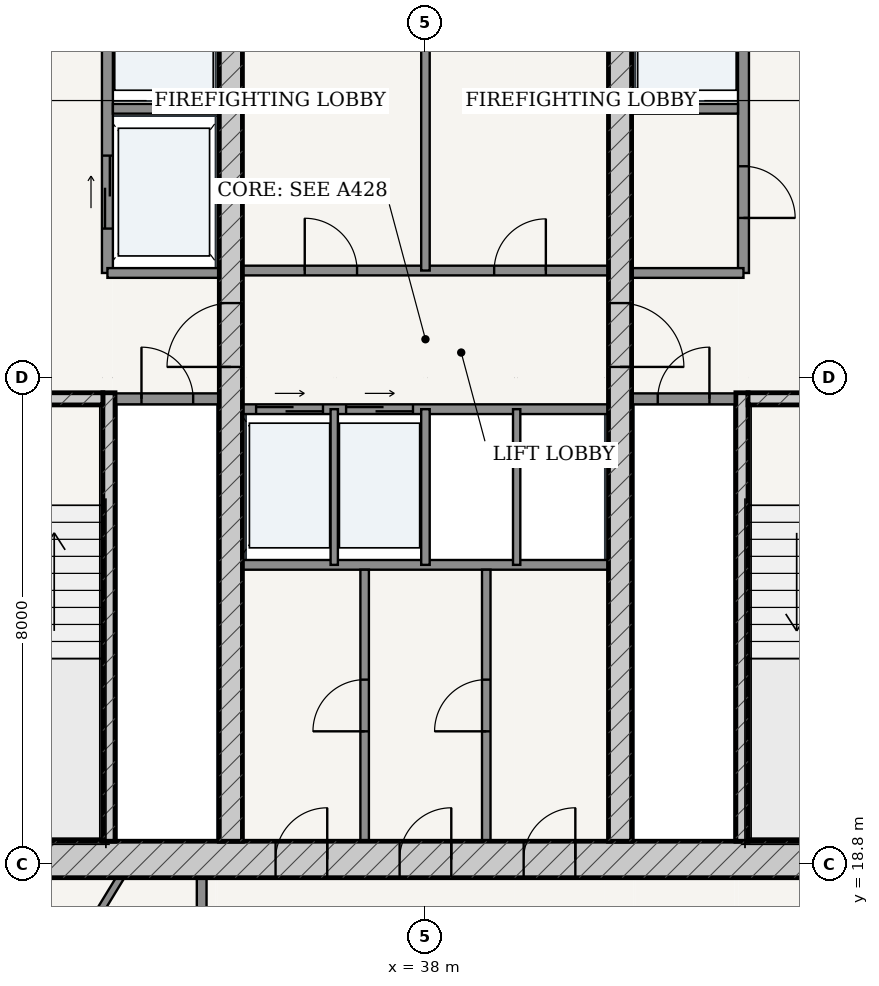
"""IFC4 building model, lengths in metres.
Left out: names, types, materials, properties, quantities, classifications, styles, units other than length and angle.
Written with IfcOpenShell. Run it as: python <this file> out.ifc"""

import sys

from ifc_helpers import new_model, si_unit, direction, frame, frame_2d, origin, place, context, subcontext, project, spatial, rectangle, extrude, source, transform, mapped, element, fill, save


model = new_model("IFC4")
c1 = context("Model", 3, precision=1e-05, world=origin(), true_north=direction((-0.2419218956, 0.970295726276)))
c2 = subcontext(c1, "Body", "Model", "MODEL_VIEW")
j1 = project(units=[si_unit("LENGTHUNIT", "METRE"), si_unit("PLANEANGLEUNIT", "RADIAN")], contexts=[c1])
p1 = place(None, origin())
s1 = spatial("IfcSite", under=j1, at=p1, CompositionType="ELEMENT")
p2 = place(p1, origin())
s2 = spatial("IfcBuilding", under=s1, at=p2, CompositionType="ELEMENT")
p3 = place(p2, frame((0.0, 0.0, 206.0)))
s3 = spatial("IfcBuildingStorey", under=s2, at=p3, CompositionType="ELEMENT", Elevation=206.0)
p4 = place(p3, frame((28.775, 18.875, 0.0), z_axis=(0.0, 0.0, 1.0), x_axis=(1.0, 0.0, 0.0)))
e1 = element("IfcWall", 1, at=p4, inside=s3, PredefinedType="SHEAR", context=c2, shape_type="SweptSolid", body=[
    extrude(rectangle(XDim=18.45, YDim=0.6, at=frame_2d((9.225, 0.0))), origin(), (0.0, 0.0, 1.0), 3.435),
])
p5 = place(p4, frame((6.76, 0.0, 0.0)))
e2 = element("IfcOpeningElement", 2, at=p5, cuts=e1, PredefinedType="OPENING", context=c2, shape_type="SweptSolid", body=[
    extrude(rectangle(XDim=0.85, YDim=2.1, at=frame_2d((0.425, 1.05))), frame((0.0, 0.31, 0.0), z_axis=(0.0, -1.0, 0.0), x_axis=(1.0, 0.0, 0.0)), (0.0, 0.0, 1.0), 0.62),
])
p6 = place(p4, frame((8.8, 0.0, 0.0)))
e3 = element("IfcOpeningElement", 3, at=p6, cuts=e1, PredefinedType="OPENING", context=c2, shape_type="SweptSolid", body=[
    extrude(rectangle(XDim=0.85, YDim=2.1, at=frame_2d((0.425, 1.05))), frame((0.0, 0.31, 0.0), z_axis=(0.0, -1.0, 0.0), x_axis=(1.0, 0.0, 0.0)), (0.0, 0.0, 1.0), 0.62),
])
p7 = place(p4, frame((10.84, 0.0, 0.0)))
e4 = element("IfcOpeningElement", 4, at=p7, cuts=e1, PredefinedType="OPENING", context=c2, shape_type="SweptSolid", body=[
    extrude(rectangle(XDim=0.85, YDim=2.1, at=frame_2d((0.425, 1.05))), frame((0.0, 0.31, 0.0), z_axis=(0.0, -1.0, 0.0), x_axis=(1.0, 0.0, 0.0)), (0.0, 0.0, 1.0), 0.62),
])
p8 = place(p3, frame((32.795, 19.175, 0.0), z_axis=(0.0, 0.0, 1.0), x_axis=(0.0, 1.0, 0.0)))
e5 = element("IfcWall", 5, at=p8, inside=s3, PredefinedType="SOLIDWALL", context=c2, shape_type="SweptSolid", body=[
    extrude(rectangle(XDim=7.375, YDim=0.2, at=frame_2d((3.688, 0.0))), origin(), (0.0, 0.0, 1.0), 3.435),
])
p9 = place(p3, frame((29.375, 26.45, 0.0), z_axis=(0.0, 0.0, 1.0), x_axis=(1.0, 0.0, 0.0)))
e6 = element("IfcWall", 6, at=p9, inside=s3, PredefinedType="SOLIDWALL", context=c2, shape_type="SweptSolid", body=[
    extrude(rectangle(XDim=3.32, YDim=0.2, at=frame_2d((1.66, 0.0))), origin(), (0.0, 0.0, 1.0), 3.435),
])
p10 = place(p9, frame((1.185, 0.0, 0.0)))
e7 = element("IfcOpeningElement", 7, at=p10, cuts=e6, PredefinedType="OPENING", context=c2, shape_type="SweptSolid", body=[
    extrude(rectangle(XDim=0.95, YDim=2.15, at=frame_2d((0.475, 1.075))), frame((0.0, 0.11, 0.0), z_axis=(0.0, -1.0, 0.0), x_axis=(1.0, 0.0, 0.0)), (0.0, 0.0, 1.0), 0.22),
])
p11 = place(p3, frame((43.205, 19.175, 0.0), z_axis=(0.0, 0.0, 1.0), x_axis=(0.0, 1.0, 0.0)))
e8 = element("IfcWall", 8, at=p11, inside=s3, PredefinedType="SOLIDWALL", context=c2, shape_type="SweptSolid", body=[
    extrude(rectangle(XDim=7.375, YDim=0.2, at=frame_2d((3.688, 0.0))), origin(), (0.0, 0.0, 1.0), 3.435),
])
p12 = place(p3, frame((43.305, 26.45, 0.0), z_axis=(0.0, 0.0, 1.0), x_axis=(1.0, 0.0, 0.0)))
e9 = element("IfcWall", 9, at=p12, inside=s3, PredefinedType="SOLIDWALL", context=c2, shape_type="SweptSolid", body=[
    extrude(rectangle(XDim=3.32, YDim=0.2, at=frame_2d((1.66, 0.0))), origin(), (0.0, 0.0, 1.0), 3.435),
])
p13 = place(p12, frame((1.185, 0.0, 0.0)))
e10 = element("IfcOpeningElement", 10, at=p13, cuts=e9, PredefinedType="OPENING", context=c2, shape_type="SweptSolid", body=[
    extrude(rectangle(XDim=0.95, YDim=2.15, at=frame_2d((0.475, 1.075))), frame((0.0, 0.11, 0.0), z_axis=(0.0, -1.0, 0.0), x_axis=(1.0, 0.0, 0.0)), (0.0, 0.0, 1.0), 0.22),
])
p14 = place(p3, frame((34.8, 19.175, 0.0), z_axis=(0.0, 0.0, 1.0), x_axis=(0.0, 1.0, 0.0)))
e11 = element("IfcWall", 11, at=p14, inside=s3, PredefinedType="SHEAR", context=c2, shape_type="SweptSolid", body=[
    extrude(rectangle(XDim=15.25, YDim=0.38, at=frame_2d((7.625, 0.0))), origin(), (0.0, 0.0, 1.0), 3.435),
])
p15 = place(p14, frame((7.8, 0.0, 0.0)))
e12 = element("IfcOpeningElement", 12, at=p15, cuts=e11, PredefinedType="OPENING", context=c2, shape_type="SweptSolid", body=[
    extrude(rectangle(XDim=1.05, YDim=2.15, at=frame_2d((0.525, 1.075))), frame((0.0, 0.2, 0.0), z_axis=(0.0, -1.0, 0.0), x_axis=(1.0, 0.0, 0.0)), (0.0, 0.0, 1.0), 0.4),
])
p16 = place(p3, frame((41.2, 19.175, 0.0), z_axis=(0.0, 0.0, 1.0), x_axis=(0.0, 1.0, 0.0)))
e13 = element("IfcWall", 13, at=p16, inside=s3, PredefinedType="SHEAR", context=c2, shape_type="SweptSolid", body=[
    extrude(rectangle(XDim=15.25, YDim=0.38, at=frame_2d((7.625, 0.0))), origin(), (0.0, 0.0, 1.0), 3.435),
])
p17 = place(p16, frame((7.8, 0.0, 0.0)))
e14 = element("IfcOpeningElement", 14, at=p17, cuts=e13, PredefinedType="OPENING", context=c2, shape_type="SweptSolid", body=[
    extrude(rectangle(XDim=1.05, YDim=2.15, at=frame_2d((0.525, 1.075))), frame((0.0, 0.2, 0.0), z_axis=(0.0, -1.0, 0.0), x_axis=(1.0, 0.0, 0.0)), (0.0, 0.0, 1.0), 0.4),
])
p18 = place(p3, frame((32.9, 26.45, 0.0), z_axis=(0.0, 0.0, 1.0), x_axis=(1.0, 0.0, 0.0)))
e15 = element("IfcWall", 15, at=p18, inside=s3, PredefinedType="PARTITIONING", context=c2, shape_type="SweptSolid", body=[
    extrude(rectangle(XDim=1.71, YDim=0.18, at=frame_2d((0.855, 0.0))), origin(), (0.0, 0.0, 1.0), 3.435),
])
p19 = place(p18, frame((0.43, 0.0, 0.0)))
e16 = element("IfcOpeningElement", 16, at=p19, cuts=e15, PredefinedType="OPENING", context=c2, shape_type="SweptSolid", body=[
    extrude(rectangle(XDim=0.85, YDim=2.1, at=frame_2d((0.425, 1.05))), frame((0.0, 0.1, 0.0), z_axis=(0.0, -1.0, 0.0), x_axis=(1.0, 0.0, 0.0)), (0.0, 0.0, 1.0), 0.2),
])
p20 = place(p3, frame((41.39, 26.45, 0.0), z_axis=(0.0, 0.0, 1.0), x_axis=(1.0, 0.0, 0.0)))
e17 = element("IfcWall", 17, at=p20, inside=s3, PredefinedType="PARTITIONING", context=c2, shape_type="SweptSolid", body=[
    extrude(rectangle(XDim=1.71, YDim=0.18, at=frame_2d((0.855, 0.0))), origin(), (0.0, 0.0, 1.0), 3.435),
])
p21 = place(p20, frame((0.43, 0.0, 0.0)))
e18 = element("IfcOpeningElement", 18, at=p21, cuts=e17, PredefinedType="OPENING", context=c2, shape_type="SweptSolid", body=[
    extrude(rectangle(XDim=0.85, YDim=2.1, at=frame_2d((0.425, 1.05))), frame((0.0, 0.1, 0.0), z_axis=(0.0, -1.0, 0.0), x_axis=(1.0, 0.0, 0.0)), (0.0, 0.0, 1.0), 0.2),
])
p22 = place(p3, frame((32.77, 28.52, 0.0), z_axis=(0.0, 0.0, 1.0), x_axis=(0.0, 1.0, 0.0)))
e19 = element("IfcWall", 19, at=p22, inside=s3, PredefinedType="PARTITIONING", context=c2, shape_type="SweptSolid", body=[
    extrude(rectangle(XDim=5.905, YDim=0.18, at=frame_2d((2.953, 0.0))), origin(), (0.0, 0.0, 1.0), 3.435),
])
p23 = place(p22, frame((3.655, 0.0, 0.0)))
e20 = element("IfcOpeningElement", 20, at=p23, cuts=e19, PredefinedType="OPENING", context=c2, shape_type="SweptSolid", body=[
    extrude(rectangle(XDim=1.15, YDim=2.2, at=frame_2d((0.575, 1.1))), frame((0.0, 0.1, 0.0), z_axis=(0.0, -1.0, 0.0), x_axis=(1.0, 0.0, 0.0)), (0.0, 0.0, 1.0), 0.2),
])
p24 = place(p22, frame((0.73, 0.0, 0.0)))
e21 = element("IfcOpeningElement", 21, at=p24, cuts=e19, PredefinedType="OPENING", context=c2, shape_type="SweptSolid", body=[
    extrude(rectangle(XDim=1.2, YDim=2.25, at=frame_2d((0.6, 1.125))), frame((0.0, 0.1, 0.0), z_axis=(0.0, -1.0, 0.0), x_axis=(1.0, 0.0, 0.0)), (0.0, 0.0, 1.0), 0.2),
])
p25 = place(p3, frame((32.86, 31.22, 0.0), z_axis=(0.0, 0.0, 1.0), x_axis=(1.0, 0.0, 0.0)))
e22 = element("IfcWall", 22, at=p25, inside=s3, PredefinedType="PARTITIONING", context=c2, shape_type="SweptSolid", body=[
    extrude(rectangle(XDim=1.75, YDim=0.16, at=frame_2d((0.875, 0.0))), origin(), (0.0, 0.0, 1.0), 3.435),
])
p26 = place(p3, frame((32.77, 28.52, 0.0), z_axis=(0.0, 0.0, 1.0), x_axis=(1.0, 0.0, 0.0)))
e23 = element("IfcWall", 23, at=p26, inside=s3, PredefinedType="PARTITIONING", context=c2, shape_type="SweptSolid", body=[
    extrude(rectangle(XDim=1.84, YDim=0.16, at=frame_2d((0.92, 0.0))), origin(), (0.0, 0.0, 1.0), 3.435),
])
p27 = place(p3, frame((43.23, 28.52, 0.0), z_axis=(0.0, 0.0, 1.0), x_axis=(0.0, 1.0, 0.0)))
e24 = element("IfcWall", 24, at=p27, inside=s3, PredefinedType="PARTITIONING", context=c2, shape_type="SweptSolid", body=[
    extrude(rectangle(XDim=5.905, YDim=0.18, at=frame_2d((2.953, 0.0))), origin(), (0.0, 0.0, 1.0), 3.435),
])
p28 = place(p27, frame((0.905, 0.0, 0.0)))
e25 = element("IfcOpeningElement", 25, at=p28, cuts=e24, PredefinedType="OPENING", context=c2, shape_type="SweptSolid", body=[
    extrude(rectangle(XDim=0.85, YDim=2.1, at=frame_2d((0.425, 1.05))), frame((0.0, 0.1, 0.0), z_axis=(0.0, -1.0, 0.0), x_axis=(1.0, 0.0, 0.0)), (0.0, 0.0, 1.0), 0.2),
])
p29 = place(p27, frame((3.655, 0.0, 0.0)))
e26 = element("IfcOpeningElement", 26, at=p29, cuts=e24, PredefinedType="OPENING", context=c2, shape_type="SweptSolid", body=[
    extrude(rectangle(XDim=1.15, YDim=2.2, at=frame_2d((0.575, 1.1))), frame((0.0, 0.1, 0.0), z_axis=(0.0, -1.0, 0.0), x_axis=(1.0, 0.0, 0.0)), (0.0, 0.0, 1.0), 0.2),
])
p30 = place(p3, frame((41.39, 31.22, 0.0), z_axis=(0.0, 0.0, 1.0), x_axis=(1.0, 0.0, 0.0)))
e27 = element("IfcWall", 27, at=p30, inside=s3, PredefinedType="PARTITIONING", context=c2, shape_type="SweptSolid", body=[
    extrude(rectangle(XDim=1.75, YDim=0.16, at=frame_2d((0.875, 0.0))), origin(), (0.0, 0.0, 1.0), 3.435),
])
p31 = place(p3, frame((41.39, 28.52, 0.0), z_axis=(0.0, 0.0, 1.0), x_axis=(1.0, 0.0, 0.0)))
e28 = element("IfcWall", 28, at=p31, inside=s3, PredefinedType="PARTITIONING", context=c2, shape_type="SweptSolid", body=[
    extrude(rectangle(XDim=1.84, YDim=0.16, at=frame_2d((0.92, 0.0))), origin(), (0.0, 0.0, 1.0), 3.435),
])
p32 = place(p3, frame((34.99, 28.56, 0.0), z_axis=(0.0, 0.0, 1.0), x_axis=(1.0, 0.0, 0.0)))
e29 = element("IfcWall", 29, at=p32, inside=s3, PredefinedType="PARTITIONING", context=c2, shape_type="SweptSolid", body=[
    extrude(rectangle(XDim=6.02, YDim=0.16, at=frame_2d((3.01, 0.0))), origin(), (0.0, 0.0, 1.0), 3.435),
])
p33 = place(p32, frame((1.025, 0.0, 0.0)))
e30 = element("IfcOpeningElement", 30, at=p33, cuts=e29, PredefinedType="OPENING", context=c2, shape_type="SweptSolid", body=[
    extrude(rectangle(XDim=0.86, YDim=2.1, at=frame_2d((0.43, 1.05))), frame((0.0, 0.09, 0.0), z_axis=(0.0, -1.0, 0.0), x_axis=(1.0, 0.0, 0.0)), (0.0, 0.0, 1.0), 0.18),
])
p34 = place(p32, frame((4.14, 0.0, 0.0)))
e31 = element("IfcOpeningElement", 31, at=p34, cuts=e29, PredefinedType="OPENING", context=c2, shape_type="SweptSolid", body=[
    extrude(rectangle(XDim=0.85, YDim=2.1, at=frame_2d((0.425, 1.05))), frame((0.0, 0.09, 0.0), z_axis=(0.0, -1.0, 0.0), x_axis=(1.0, 0.0, 0.0)), (0.0, 0.0, 1.0), 0.18),
])
p35 = place(p3, frame((38.0, 28.56, 0.0), z_axis=(0.0, 0.0, 1.0), x_axis=(0.0, 1.0, 0.0)))
e32 = element("IfcWall", 32, at=p35, inside=s3, PredefinedType="PARTITIONING", context=c2, shape_type="SweptSolid", body=[
    extrude(rectangle(XDim=5.865, YDim=0.14, at=frame_2d((2.933, 0.0))), origin(), (0.0, 0.0, 1.0), 3.435),
])
p36 = place(p3, frame((34.99, 26.28, 0.0), z_axis=(0.0, 0.0, 1.0), x_axis=(1.0, 0.0, 0.0)))
e33 = element("IfcWall", 33, at=p36, inside=s3, PredefinedType="PARTITIONING", context=c2, shape_type="SweptSolid", body=[
    extrude(rectangle(XDim=6.02, YDim=0.16, at=frame_2d((3.01, 0.0))), origin(), (0.0, 0.0, 1.0), 3.435),
])
p37 = place(p36, frame((0.225, 0.0, 0.0)))
e34 = element("IfcOpeningElement", 34, at=p37, cuts=e33, PredefinedType="OPENING", context=c2, shape_type="SweptSolid", body=[
    extrude(rectangle(XDim=1.1, YDim=2.2, at=frame_2d((0.55, 1.1))), frame((0.0, 0.09, 0.0), z_axis=(0.0, -1.0, 0.0), x_axis=(1.0, 0.0, 0.0)), (0.0, 0.0, 1.0), 0.18),
])
p38 = place(p36, frame((1.705, 0.0, 0.0)))
e35 = element("IfcOpeningElement", 35, at=p38, cuts=e33, PredefinedType="OPENING", context=c2, shape_type="SweptSolid", body=[
    extrude(rectangle(XDim=1.1, YDim=2.2, at=frame_2d((0.55, 1.1))), frame((0.0, 0.09, 0.0), z_axis=(0.0, -1.0, 0.0), x_axis=(1.0, 0.0, 0.0)), (0.0, 0.0, 1.0), 0.18),
])
p39 = place(p3, frame((34.99, 23.72, 0.0), z_axis=(0.0, 0.0, 1.0), x_axis=(1.0, 0.0, 0.0)))
e36 = element("IfcWall", 36, at=p39, inside=s3, PredefinedType="PARTITIONING", context=c2, shape_type="SweptSolid", body=[
    extrude(rectangle(XDim=6.02, YDim=0.16, at=frame_2d((3.01, 0.0))), origin(), (0.0, 0.0, 1.0), 3.435),
])
p40 = place(p3, frame((36.5, 23.72, 0.0), z_axis=(0.0, 0.0, 1.0), x_axis=(0.0, 1.0, 0.0)))
e37 = element("IfcWall", 37, at=p40, inside=s3, PredefinedType="PARTITIONING", context=c2, shape_type="SweptSolid", body=[
    extrude(rectangle(XDim=2.56, YDim=0.12, at=frame_2d((1.28, 0.0))), origin(), (0.0, 0.0, 1.0), 3.435),
])
p41 = place(p3, frame((38.0, 23.72, 0.0), z_axis=(0.0, 0.0, 1.0), x_axis=(0.0, 1.0, 0.0)))
e38 = element("IfcWall", 38, at=p41, inside=s3, PredefinedType="PARTITIONING", context=c2, shape_type="SweptSolid", body=[
    extrude(rectangle(XDim=2.56, YDim=0.14, at=frame_2d((1.28, 0.0))), origin(), (0.0, 0.0, 1.0), 3.435),
])
p42 = place(p3, frame((39.5, 23.72, 0.0), z_axis=(0.0, 0.0, 1.0), x_axis=(0.0, 1.0, 0.0)))
e39 = element("IfcWall", 39, at=p42, inside=s3, PredefinedType="PARTITIONING", context=c2, shape_type="SweptSolid", body=[
    extrude(rectangle(XDim=2.56, YDim=0.12, at=frame_2d((1.28, 0.0))), origin(), (0.0, 0.0, 1.0), 3.435),
])
p43 = place(p3, frame((37.0, 19.175, 0.0), z_axis=(0.0, 0.0, 1.0), x_axis=(0.0, 1.0, 0.0)))
e40 = element("IfcWall", 40, at=p43, inside=s3, PredefinedType="PARTITIONING", context=c2, shape_type="SweptSolid", body=[
    extrude(rectangle(XDim=4.465, YDim=0.14, at=frame_2d((2.232, 0.0))), origin(), (0.0, 0.0, 1.0), 3.435),
])
p44 = place(p43, frame((1.808, 0.0, 0.0)))
e41 = element("IfcOpeningElement", 41, at=p44, cuts=e40, PredefinedType="OPENING", context=c2, shape_type="SweptSolid", body=[
    extrude(rectangle(XDim=0.85, YDim=2.1, at=frame_2d((0.425, 1.05))), frame((0.0, 0.08, 0.0), z_axis=(0.0, -1.0, 0.0), x_axis=(1.0, 0.0, 0.0)), (0.0, 0.0, 1.0), 0.16),
])
p45 = place(p3, frame((39.0, 19.175, 0.0), z_axis=(0.0, 0.0, 1.0), x_axis=(0.0, 1.0, 0.0)))
e42 = element("IfcWall", 42, at=p45, inside=s3, PredefinedType="PARTITIONING", context=c2, shape_type="SweptSolid", body=[
    extrude(rectangle(XDim=4.465, YDim=0.14, at=frame_2d((2.232, 0.0))), origin(), (0.0, 0.0, 1.0), 3.435),
])
p46 = place(p45, frame((1.808, 0.0, 0.0)))
e43 = element("IfcOpeningElement", 43, at=p46, cuts=e42, PredefinedType="OPENING", context=c2, shape_type="SweptSolid", body=[
    extrude(rectangle(XDim=0.85, YDim=2.1, at=frame_2d((0.425, 1.05))), frame((0.0, 0.08, 0.0), z_axis=(0.0, -1.0, 0.0), x_axis=(1.0, 0.0, 0.0)), (0.0, 0.0, 1.0), 0.16),
])
p47 = place(p3, frame((34.32, 16.725, 0.0), z_axis=(0.0, 0.0, 1.0), x_axis=(0.0, 1.0, 0.0)))
e44 = element("IfcWall", 44, at=p47, inside=s3, PredefinedType="PARTITIONING", context=c2, shape_type="SweptSolid", body=[
    extrude(rectangle(XDim=1.85, YDim=0.16, at=frame_2d((0.925, 0.0))), origin(), (0.0, 0.0, 1.0), 3.435),
])
p48 = place(p3, frame((32.981, 18.575, 0.0), z_axis=(0.0, 0.0, 1.0), x_axis=(-0.520926540997, -0.853601510592, 0.0)))
e45 = element("IfcWall", 45, at=p48, inside=s3, PredefinedType="PARTITIONING", context=c2, shape_type="SweptSolid", body=[
    extrude(rectangle(XDim=2.679, YDim=0.12, at=frame_2d((1.34, 0.0))), origin(), (0.0, 0.0, 1.0), 3.435),
])
m1 = source(origin(), c2, "Body", "SweptSolid", [
    extrude(rectangle(XDim=1.05, YDim=2.15, at=frame_2d((0.525, 1.075))), frame((0.0, 0.025, 0.0), z_axis=(0.0, -1.0, 0.0), x_axis=(1.0, 0.0, 0.0)), (0.0, 0.0, 1.0), 0.05),
])
p49 = place(p15, origin())
e46 = element("IfcDoor", 46, at=p49, inside=s3, OperationType="SINGLE_SWING_LEFT", PredefinedType="DOOR", context=c2, shape_type="MappedRepresentation", body=[
    mapped(m1, transform((0.0, 0.0, 0.0), scale=1.0)),
])
fill(e12, e46)
p50 = place(p17, frame((1.05, 0.0, 0.0), z_axis=(0.0, 0.0, 1.0), x_axis=(-1.0, 0.0, 0.0)))
e47 = element("IfcDoor", 47, at=p50, inside=s3, OperationType="SINGLE_SWING_RIGHT", PredefinedType="DOOR", context=c2, shape_type="MappedRepresentation", body=[
    mapped(m1, transform((0.0, 0.0, 0.0), scale=1.0)),
])
fill(e14, e47)
m2 = source(origin(), c2, "Body", "SweptSolid", [
    extrude(rectangle(XDim=0.85, YDim=2.1, at=frame_2d((0.425, 1.05))), frame((0.0, 0.025, 0.0), z_axis=(0.0, -1.0, 0.0), x_axis=(1.0, 0.0, 0.0)), (0.0, 0.0, 1.0), 0.05),
])
p51 = place(p19, origin())
e48 = element("IfcDoor", 48, at=p51, inside=s3, OperationType="SINGLE_SWING_LEFT", PredefinedType="DOOR", context=c2, shape_type="MappedRepresentation", body=[
    mapped(m2, transform((0.0, 0.0, 0.0), scale=1.0)),
])
fill(e16, e48)
p52 = place(p21, origin())
e49 = element("IfcDoor", 49, at=p52, inside=s3, OperationType="SINGLE_SWING_RIGHT", PredefinedType="DOOR", context=c2, shape_type="MappedRepresentation", body=[
    mapped(m2, transform((0.0, 0.0, 0.0), scale=1.0)),
])
fill(e18, e49)
p53 = place(p28, frame((0.85, 0.0, 0.0), z_axis=(0.0, 0.0, 1.0), x_axis=(-1.0, 0.0, 0.0)))
e50 = element("IfcDoor", 50, at=p53, inside=s3, OperationType="SINGLE_SWING_RIGHT", PredefinedType="DOOR", context=c2, shape_type="MappedRepresentation", body=[
    mapped(m2, transform((0.0, 0.0, 0.0), scale=1.0)),
])
fill(e25, e50)
m3 = source(origin(), c2, "Body", "SweptSolid", [
    extrude(rectangle(XDim=0.86, YDim=2.1, at=frame_2d((0.43, 1.05))), frame((0.0, 0.025, 0.0), z_axis=(0.0, -1.0, 0.0), x_axis=(1.0, 0.0, 0.0)), (0.0, 0.0, 1.0), 0.05),
])
p54 = place(p33, origin())
e51 = element("IfcDoor", 51, at=p54, inside=s3, OperationType="SINGLE_SWING_LEFT", PredefinedType="DOOR", context=c2, shape_type="MappedRepresentation", body=[
    mapped(m3, transform((0.0, 0.0, 0.0), scale=1.0)),
])
fill(e30, e51)
p55 = place(p34, origin())
e52 = element("IfcDoor", 52, at=p55, inside=s3, OperationType="SINGLE_SWING_RIGHT", PredefinedType="DOOR", context=c2, shape_type="MappedRepresentation", body=[
    mapped(m2, transform((0.0, 0.0, 0.0), scale=1.0)),
])
fill(e31, e52)
p56 = place(p5, origin())
e53 = element("IfcDoor", 53, at=p56, inside=s3, OperationType="SINGLE_SWING_RIGHT", PredefinedType="DOOR", context=c2, shape_type="MappedRepresentation", body=[
    mapped(m2, transform((0.0, 0.0, 0.0), scale=1.0)),
])
fill(e2, e53)
p57 = place(p6, origin())
e54 = element("IfcDoor", 54, at=p57, inside=s3, OperationType="SINGLE_SWING_RIGHT", PredefinedType="DOOR", context=c2, shape_type="MappedRepresentation", body=[
    mapped(m2, transform((0.0, 0.0, 0.0), scale=1.0)),
])
fill(e3, e54)
p58 = place(p7, origin())
e55 = element("IfcDoor", 55, at=p58, inside=s3, OperationType="SINGLE_SWING_RIGHT", PredefinedType="DOOR", context=c2, shape_type="MappedRepresentation", body=[
    mapped(m2, transform((0.0, 0.0, 0.0), scale=1.0)),
])
fill(e4, e55)
p59 = place(p44, origin())
e56 = element("IfcDoor", 56, at=p59, inside=s3, OperationType="SINGLE_SWING_LEFT", PredefinedType="DOOR", context=c2, shape_type="MappedRepresentation", body=[
    mapped(m2, transform((0.0, 0.0, 0.0), scale=1.0)),
])
fill(e41, e56)
p60 = place(p46, origin())
e57 = element("IfcDoor", 57, at=p60, inside=s3, OperationType="SINGLE_SWING_LEFT", PredefinedType="DOOR", context=c2, shape_type="MappedRepresentation", body=[
    mapped(m2, transform((0.0, 0.0, 0.0), scale=1.0)),
])
fill(e43, e57)
m4 = source(origin(), c2, "Body", "SweptSolid", [
    extrude(rectangle(XDim=1.2, YDim=2.25, at=frame_2d((0.6, 1.125))), frame((0.0, 0.025, 0.0), z_axis=(0.0, -1.0, 0.0), x_axis=(1.0, 0.0, 0.0)), (0.0, 0.0, 1.0), 0.05),
])
p61 = place(p24, origin())
e58 = element("IfcDoor", 58, at=p61, inside=s3, OperationType="DOUBLE_DOOR_SLIDING", PredefinedType="DOOR", context=c2, shape_type="MappedRepresentation", body=[
    mapped(m4, transform((0.0, 0.0, 0.0), scale=1.0)),
])
fill(e21, e58)
m5 = source(origin(), c2, "Body", "SweptSolid", [
    extrude(rectangle(XDim=1.1, YDim=2.2, at=frame_2d((0.55, 1.1))), frame((0.0, 0.025, 0.0), z_axis=(0.0, -1.0, 0.0), x_axis=(1.0, 0.0, 0.0)), (0.0, 0.0, 1.0), 0.05),
])
p62 = place(p37, origin())
e59 = element("IfcDoor", 59, at=p62, inside=s3, OperationType="DOUBLE_DOOR_SLIDING", PredefinedType="DOOR", context=c2, shape_type="MappedRepresentation", body=[
    mapped(m5, transform((0.0, 0.0, 0.0), scale=1.0)),
])
fill(e34, e59)
p63 = place(p38, origin())
e60 = element("IfcDoor", 60, at=p63, inside=s3, OperationType="DOUBLE_DOOR_SLIDING", PredefinedType="DOOR", context=c2, shape_type="MappedRepresentation", body=[
    mapped(m5, transform((0.0, 0.0, 0.0), scale=1.0)),
])
fill(e35, e60)
save(model, sys.argv[1])
